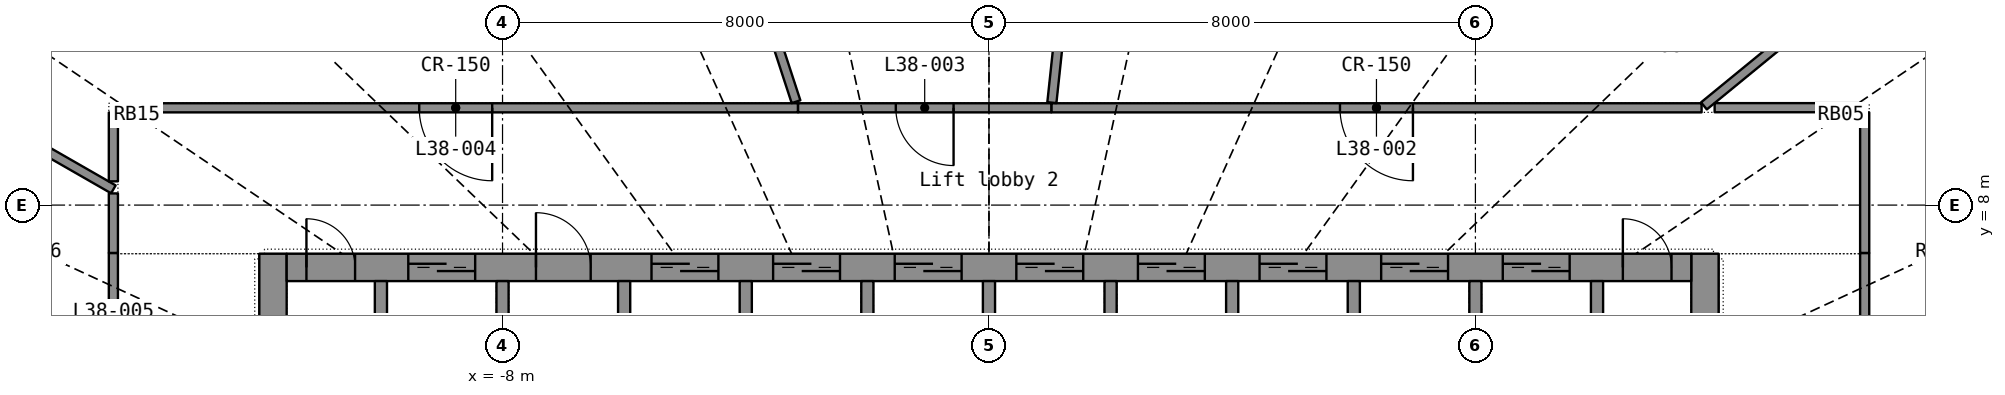
"""IFC4 building model, lengths in metres.
Left out: names, types, materials, properties, quantities, classifications, styles, units other than length and angle.
Written with IfcOpenShell. Run it as: python <this file> out.ifc"""

import sys

from ifc_helpers import new_model, si_unit, direction, frame, frame_2d, origin, place, context, subcontext, project, spatial, rectangle, extrude, element, fill, save


model = new_model("IFC4")
c1 = context("Model", 3, precision=1e-05, world=origin(), true_north=direction((0.0, 1.0)))
c2 = subcontext(c1, "Body", "Model", "MODEL_VIEW")
j1 = project(units=[si_unit("LENGTHUNIT", "METRE"), si_unit("PLANEANGLEUNIT", "RADIAN")], contexts=[c1])
p1 = place(None, origin())
s1 = spatial("IfcSite", under=j1, at=p1, CompositionType="ELEMENT")
p2 = place(p1, origin())
s2 = spatial("IfcBuilding", under=s1, at=p2, CompositionType="ELEMENT")
p3 = place(p2, frame((0.0, 0.0, 160.8)))
s3 = spatial("IfcBuildingStorey", under=s2, at=p3, CompositionType="ELEMENT", Elevation=160.8)
p4 = place(p3, frame((-11.775, -7.2, 0.0), z_axis=(0.0, 0.0, 1.0), x_axis=(0.0, 1.0, 0.0)))
e1 = element("IfcWall", 1, at=p4, inside=s3, PredefinedType="SHEAR", context=c2, shape_type="SweptSolid", body=[
    extrude(rectangle(XDim=14.4, YDim=0.45, at=frame_2d((7.2, 0.0))), origin(), (0.0, 0.0, 1.0), 3.3),
])
p5 = place(p4, frame((6.5, 0.0, 0.0)))
e2 = element("IfcOpeningElement", 2, at=p5, cuts=e1, PredefinedType="OPENING", context=c2, shape_type="SweptSolid", body=[
    extrude(rectangle(XDim=1.4, YDim=2.2, at=frame_2d((0.7, 1.1))), frame((0.0, 0.235, 0.0), z_axis=(0.0, -1.0, 0.0), x_axis=(1.0, 0.0, 0.0)), (0.0, 0.0, 1.0), 0.47),
])
p6 = place(p3, frame((11.775, -7.2, 0.0), z_axis=(0.0, 0.0, 1.0), x_axis=(0.0, 1.0, 0.0)))
e3 = element("IfcWall", 3, at=p6, inside=s3, PredefinedType="SHEAR", context=c2, shape_type="SweptSolid", body=[
    extrude(rectangle(XDim=14.4, YDim=0.45, at=frame_2d((7.2, 0.0))), origin(), (0.0, 0.0, 1.0), 3.3),
])
p7 = place(p6, frame((6.5, 0.0, 0.0)))
e4 = element("IfcOpeningElement", 4, at=p7, cuts=e3, PredefinedType="OPENING", context=c2, shape_type="SweptSolid", body=[
    extrude(rectangle(XDim=1.4, YDim=2.2, at=frame_2d((0.7, 1.1))), frame((0.0, 0.235, 0.0), z_axis=(0.0, -1.0, 0.0), x_axis=(1.0, 0.0, 0.0)), (0.0, 0.0, 1.0), 0.47),
])
p8 = place(p3, frame((-11.55, 6.975, 0.0), z_axis=(0.0, 0.0, 1.0), x_axis=(1.0, 0.0, 0.0)))
e5 = element("IfcWall", 5, at=p8, inside=s3, PredefinedType="SHEAR", context=c2, shape_type="SweptSolid", body=[
    extrude(rectangle(XDim=23.1, YDim=0.45, at=frame_2d((11.55, 0.0))), origin(), (0.0, 0.0, 1.0), 3.3),
])
p9 = place(p8, frame((2.0, 0.0, 0.0)))
e6 = element("IfcOpeningElement", 6, at=p9, cuts=e5, PredefinedType="OPENING", context=c2, shape_type="SweptSolid", body=[
    extrude(rectangle(XDim=1.1, YDim=2.2, at=frame_2d((0.55, 1.1))), frame((0.0, 0.235, 0.0), z_axis=(0.0, -1.0, 0.0), x_axis=(1.0, 0.0, 0.0)), (0.0, 0.0, 1.0), 0.47),
])
p10 = place(p8, frame((6.0, 0.0, 0.0)))
e7 = element("IfcOpeningElement", 7, at=p10, cuts=e5, PredefinedType="OPENING", context=c2, shape_type="SweptSolid", body=[
    extrude(rectangle(XDim=1.1, YDim=2.2, at=frame_2d((0.55, 1.1))), frame((0.0, 0.235, 0.0), z_axis=(0.0, -1.0, 0.0), x_axis=(1.0, 0.0, 0.0)), (0.0, 0.0, 1.0), 0.47),
])
p11 = place(p8, frame((8.0, 0.0, 0.0)))
e8 = element("IfcOpeningElement", 8, at=p11, cuts=e5, PredefinedType="OPENING", context=c2, shape_type="SweptSolid", body=[
    extrude(rectangle(XDim=1.1, YDim=2.2, at=frame_2d((0.55, 1.1))), frame((0.0, 0.235, 0.0), z_axis=(0.0, -1.0, 0.0), x_axis=(1.0, 0.0, 0.0)), (0.0, 0.0, 1.0), 0.47),
])
p12 = place(p8, frame((10.0, 0.0, 0.0)))
e9 = element("IfcOpeningElement", 9, at=p12, cuts=e5, PredefinedType="OPENING", context=c2, shape_type="SweptSolid", body=[
    extrude(rectangle(XDim=1.1, YDim=2.2, at=frame_2d((0.55, 1.1))), frame((0.0, 0.235, 0.0), z_axis=(0.0, -1.0, 0.0), x_axis=(1.0, 0.0, 0.0)), (0.0, 0.0, 1.0), 0.47),
])
p13 = place(p8, frame((12.0, 0.0, 0.0)))
e10 = element("IfcOpeningElement", 10, at=p13, cuts=e5, PredefinedType="OPENING", context=c2, shape_type="SweptSolid", body=[
    extrude(rectangle(XDim=1.1, YDim=2.2, at=frame_2d((0.55, 1.1))), frame((0.0, 0.235, 0.0), z_axis=(0.0, -1.0, 0.0), x_axis=(1.0, 0.0, 0.0)), (0.0, 0.0, 1.0), 0.47),
])
p14 = place(p8, frame((14.0, 0.0, 0.0)))
e11 = element("IfcOpeningElement", 11, at=p14, cuts=e5, PredefinedType="OPENING", context=c2, shape_type="SweptSolid", body=[
    extrude(rectangle(XDim=1.1, YDim=2.2, at=frame_2d((0.55, 1.1))), frame((0.0, 0.235, 0.0), z_axis=(0.0, -1.0, 0.0), x_axis=(1.0, 0.0, 0.0)), (0.0, 0.0, 1.0), 0.47),
])
p15 = place(p8, frame((16.0, 0.0, 0.0)))
e12 = element("IfcOpeningElement", 12, at=p15, cuts=e5, PredefinedType="OPENING", context=c2, shape_type="SweptSolid", body=[
    extrude(rectangle(XDim=1.1, YDim=2.2, at=frame_2d((0.55, 1.1))), frame((0.0, 0.235, 0.0), z_axis=(0.0, -1.0, 0.0), x_axis=(1.0, 0.0, 0.0)), (0.0, 0.0, 1.0), 0.47),
])
p16 = place(p8, frame((18.0, 0.0, 0.0)))
e13 = element("IfcOpeningElement", 13, at=p16, cuts=e5, PredefinedType="OPENING", context=c2, shape_type="SweptSolid", body=[
    extrude(rectangle(XDim=1.1, YDim=2.2, at=frame_2d((0.55, 1.1))), frame((0.0, 0.235, 0.0), z_axis=(0.0, -1.0, 0.0), x_axis=(1.0, 0.0, 0.0)), (0.0, 0.0, 1.0), 0.47),
])
p17 = place(p8, frame((20.0, 0.0, 0.0)))
e14 = element("IfcOpeningElement", 14, at=p17, cuts=e5, PredefinedType="OPENING", context=c2, shape_type="SweptSolid", body=[
    extrude(rectangle(XDim=1.1, YDim=2.2, at=frame_2d((0.55, 1.1))), frame((0.0, 0.235, 0.0), z_axis=(0.0, -1.0, 0.0), x_axis=(1.0, 0.0, 0.0)), (0.0, 0.0, 1.0), 0.47),
])
p18 = place(p8, frame((4.1, 0.0, 0.0)))
e15 = element("IfcOpeningElement", 15, at=p18, cuts=e5, PredefinedType="OPENING", context=c2, shape_type="SweptSolid", body=[
    extrude(rectangle(XDim=0.9, YDim=2.1, at=frame_2d((0.45, 1.05))), frame((0.0, 0.235, 0.0), z_axis=(0.0, -1.0, 0.0), x_axis=(1.0, 0.0, 0.0)), (0.0, 0.0, 1.0), 0.47),
])
p19 = place(p8, frame((0.325, 0.0, 0.0)))
e16 = element("IfcOpeningElement", 16, at=p19, cuts=e5, PredefinedType="OPENING", context=c2, shape_type="SweptSolid", body=[
    extrude(rectangle(XDim=0.8, YDim=2.05, at=frame_2d((0.4, 1.025))), frame((0.0, 0.235, 0.0), z_axis=(0.0, -1.0, 0.0), x_axis=(1.0, 0.0, 0.0)), (0.0, 0.0, 1.0), 0.47),
])
p20 = place(p8, frame((21.975, 0.0, 0.0)))
e17 = element("IfcOpeningElement", 17, at=p20, cuts=e5, PredefinedType="OPENING", context=c2, shape_type="SweptSolid", body=[
    extrude(rectangle(XDim=0.8, YDim=2.05, at=frame_2d((0.4, 1.025))), frame((0.0, 0.235, 0.0), z_axis=(0.0, -1.0, 0.0), x_axis=(1.0, 0.0, 0.0)), (0.0, 0.0, 1.0), 0.47),
])
for number, where, z_axis, x_axis in (
    (18, (-10.0, 3.9, 0.0), (0.0, 0.0, 1.0), (0.0, 1.0, 0.0)),
    (19, (-8.0, 3.9, 0.0), (0.0, 0.0, 1.0), (0.0, 1.0, 0.0)),
    (20, (-6.0, 3.9, 0.0), (0.0, 0.0, 1.0), (0.0, 1.0, 0.0)),
    (21, (-4.0, 3.9, 0.0), (0.0, 0.0, 1.0), (0.0, 1.0, 0.0)),
    (22, (-2.0, 3.9, 0.0), (0.0, 0.0, 1.0), (0.0, 1.0, 0.0)),
    (23, (0.0, 3.9, 0.0), (0.0, 0.0, 1.0), (0.0, 1.0, 0.0)),
    (24, (2.0, 3.9, 0.0), (0.0, 0.0, 1.0), (0.0, 1.0, 0.0)),
    (25, (4.0, 3.9, 0.0), (0.0, 0.0, 1.0), (0.0, 1.0, 0.0)),
    (26, (6.0, 3.9, 0.0), (0.0, 0.0, 1.0), (0.0, 1.0, 0.0)),
    (27, (8.0, 3.9, 0.0), (0.0, 0.0, 1.0), (0.0, 1.0, 0.0)),
    (28, (10.0, 3.9, 0.0), (0.0, 0.0, 1.0), (0.0, 1.0, 0.0)),
):
    element("IfcWall", number, at=place(p3, frame(where, z_axis=z_axis, x_axis=x_axis)), inside=s3, PredefinedType="SHEAR", context=c2, shape_type="SweptSolid", body=[
        extrude(rectangle(XDim=2.85, YDim=0.2, at=frame_2d((1.425, 0.0))), origin(), (0.0, 0.0, 1.0), 3.3),
    ])
p21 = place(p3, frame((-3.14, 9.6, 0.0), z_axis=(0.0, 0.0, 1.0), x_axis=(-1.0, 0.0, 0.0)))
e29 = element("IfcWall", 29, at=p21, inside=s3, PredefinedType="PARTITIONING", context=c2, shape_type="SweptSolid", body=[
    extrude(rectangle(XDim=11.26, YDim=0.15, at=frame_2d((5.63, 0.0))), origin(), (0.0, 0.0, 1.0), 2.4),
])
p22 = place(p21, frame((5.03, 0.0, 0.0)))
e30 = element("IfcOpeningElement", 30, at=p22, cuts=e29, PredefinedType="OPENING", context=c2, shape_type="SweptSolid", body=[
    extrude(rectangle(XDim=1.2, YDim=2.2, at=frame_2d((0.6, 1.1))), frame((0.0, 0.085, 0.0), z_axis=(0.0, -1.0, 0.0), x_axis=(1.0, 0.0, 0.0)), (0.0, 0.0, 1.0), 0.17),
])
p23 = place(p3, frame((11.72, 9.6, 0.0), z_axis=(0.0, 0.0, 1.0), x_axis=(-1.0, 0.0, 0.0)))
e31 = element("IfcWall", 31, at=p23, inside=s3, PredefinedType="PARTITIONING", context=c2, shape_type="SweptSolid", body=[
    extrude(rectangle(XDim=10.695, YDim=0.15, at=frame_2d((5.347, 0.0))), origin(), (0.0, 0.0, 1.0), 2.4),
])
p24 = place(p23, frame((4.747, 0.0, 0.0)))
e32 = element("IfcOpeningElement", 32, at=p24, cuts=e31, PredefinedType="OPENING", context=c2, shape_type="SweptSolid", body=[
    extrude(rectangle(XDim=1.2, YDim=2.2, at=frame_2d((0.6, 1.1))), frame((0.0, 0.085, 0.0), z_axis=(0.0, -1.0, 0.0), x_axis=(1.0, 0.0, 0.0)), (0.0, 0.0, 1.0), 0.17),
])
p25 = place(p3, frame((2.071, 19.393, 0.0), z_axis=(0.0, 0.0, 1.0), x_axis=(-0.106198491, -0.99434495, 0.0)))
e33 = element("IfcWall", 33, at=p25, inside=s3, PredefinedType="PARTITIONING", context=c2, shape_type="SweptSolid", body=[
    extrude(rectangle(XDim=9.763, YDim=0.15, at=frame_2d((4.882, 0.0))), origin(), (0.0, 0.0, 1.0), 2.4),
])
p26 = place(p3, frame((-6.152, 18.806, 0.0), z_axis=(0.0, 0.0, 1.0), x_axis=(0.310901784, -0.950442045, 0.0)))
e34 = element("IfcWall", 34, at=p26, inside=s3, PredefinedType="PARTITIONING", context=c2, shape_type="SweptSolid", body=[
    extrude(rectangle(XDim=9.58, YDim=0.15, at=frame_2d((4.79, 0.0))), origin(), (0.0, 0.0, 1.0), 2.4),
])
p27 = place(p3, frame((16.813, 13.772, 0.0), z_axis=(0.0, 0.0, 1.0), x_axis=(-0.773595956, -0.633679175, 0.0)))
e35 = element("IfcWall", 35, at=p27, inside=s3, PredefinedType="PARTITIONING", context=c2, shape_type="SweptSolid", body=[
    extrude(rectangle(XDim=6.535, YDim=0.15, at=frame_2d((3.267, 0.0))), origin(), (0.0, 0.0, 1.0), 2.4),
])
p28 = place(p3, frame((-19.483, 11.175, 0.0), z_axis=(0.0, 0.0, 1.0), x_axis=(0.867447243, -0.497529176, 0.0)))
e36 = element("IfcWall", 36, at=p28, inside=s3, PredefinedType="PARTITIONING", context=c2, shape_type="SweptSolid", body=[
    extrude(rectangle(XDim=5.86, YDim=0.15, at=frame_2d((2.93, 0.0))), origin(), (0.0, 0.0, 1.0), 2.4),
])
p29 = place(p3, frame((14.402, 1.579, 0.0), z_axis=(0.0, 0.0, 1.0), x_axis=(0.0, 1.0, 0.0)))
e37 = element("IfcWall", 37, at=p29, inside=s3, PredefinedType="PARTITIONING", context=c2, shape_type="SweptSolid", body=[
    extrude(rectangle(XDim=5.633, YDim=0.15, at=frame_2d((2.816, 0.0))), origin(), (0.0, 0.0, 1.0), 2.4),
])
p30 = place(p3, frame((1.025, 9.6, 0.0), z_axis=(0.0, 0.0, 1.0), x_axis=(-1.0, 0.0, 0.0)))
e38 = element("IfcWall", 38, at=p30, inside=s3, PredefinedType="PARTITIONING", context=c2, shape_type="SweptSolid", body=[
    extrude(rectangle(XDim=4.165, YDim=0.15, at=frame_2d((2.083, 0.0))), origin(), (0.0, 0.0, 1.0), 2.4),
])
p31 = place(p30, frame((1.607, 0.0, 0.0)))
e39 = element("IfcOpeningElement", 39, at=p31, cuts=e38, PredefinedType="OPENING", context=c2, shape_type="SweptSolid", body=[
    extrude(rectangle(XDim=0.95, YDim=2.15, at=frame_2d((0.475, 1.075))), frame((0.0, 0.085, 0.0), z_axis=(0.0, -1.0, 0.0), x_axis=(1.0, 0.0, 0.0)), (0.0, 0.0, 1.0), 0.17),
])
p32 = place(p3, frame((-14.4, 7.212, 0.0), z_axis=(0.0, 0.0, 1.0), x_axis=(0.0, -1.0, 0.0)))
e40 = element("IfcWall", 40, at=p32, inside=s3, PredefinedType="PARTITIONING", context=c2, shape_type="SweptSolid", body=[
    extrude(rectangle(XDim=3.956, YDim=0.15, at=frame_2d((1.978, 0.0))), origin(), (0.0, 0.0, 1.0), 2.4),
])
p33 = place(p32, frame((1.503, 0.0, 0.0)))
e41 = element("IfcOpeningElement", 41, at=p33, cuts=e40, PredefinedType="OPENING", context=c2, shape_type="SweptSolid", body=[
    extrude(rectangle(XDim=0.95, YDim=2.15, at=frame_2d((0.475, 1.075))), frame((0.0, 0.085, 0.0), z_axis=(0.0, -1.0, 0.0), x_axis=(1.0, 0.0, 0.0)), (0.0, 0.0, 1.0), 0.17),
])
p34 = place(p3, frame((14.402, 9.602, 0.0), z_axis=(0.0, 0.0, 1.0), x_axis=(-1.0, 0.0, 0.0)))
e42 = element("IfcWall", 42, at=p34, inside=s3, PredefinedType="PARTITIONING", context=c2, shape_type="SweptSolid", body=[
    extrude(rectangle(XDim=2.468, YDim=0.15, at=frame_2d((1.234, 0.0))), origin(), (0.0, 0.0, 1.0), 2.4),
])
p35 = place(p3, frame((14.402, 7.213, 0.0), z_axis=(0.0, 0.0, 1.0), x_axis=(0.0, 1.0, 0.0)))
e43 = element("IfcWall", 43, at=p35, inside=s3, PredefinedType="PARTITIONING", context=c2, shape_type="SweptSolid", body=[
    extrude(rectangle(XDim=2.312, YDim=0.15, at=frame_2d((1.156, 0.0))), origin(), (0.0, 0.0, 1.0), 2.4),
])
p36 = place(p3, frame((-14.4, 9.523, 0.0), z_axis=(0.0, 0.0, 1.0), x_axis=(0.0, -1.0, 0.0)))
e44 = element("IfcWall", 44, at=p36, inside=s3, PredefinedType="PARTITIONING", context=c2, shape_type="SweptSolid", body=[
    extrude(rectangle(XDim=1.132, YDim=0.15, at=frame_2d((0.566, 0.0))), origin(), (0.0, 0.0, 1.0), 2.4),
])
p37 = place(p3, frame((-14.4, 8.192, 0.0), z_axis=(0.0, 0.0, 1.0), x_axis=(0.0, -1.0, 0.0)))
e45 = element("IfcWall", 45, at=p37, inside=s3, PredefinedType="PARTITIONING", context=c2, shape_type="SweptSolid", body=[
    extrude(rectangle(XDim=0.979, YDim=0.15, at=frame_2d((0.49, 0.0))), origin(), (0.0, 0.0, 1.0), 2.4),
])
p38 = place(p9, origin())
e46 = element("IfcDoor", 46, at=p38, inside=s3, OperationType="DOUBLE_DOOR_SLIDING", PredefinedType="DOOR", context=c2, shape_type="SweptSolid", body=[
    extrude(rectangle(XDim=1.1, YDim=2.2, at=frame_2d((0.55, 1.1))), frame((0.0, 0.025, 0.0), z_axis=(0.0, -1.0, 0.0), x_axis=(1.0, 0.0, 0.0)), (0.0, 0.0, 1.0), 0.05),
])
fill(e6, e46)
p39 = place(p10, origin())
e47 = element("IfcDoor", 47, at=p39, inside=s3, OperationType="DOUBLE_DOOR_SLIDING", PredefinedType="DOOR", context=c2, shape_type="SweptSolid", body=[
    extrude(rectangle(XDim=1.1, YDim=2.2, at=frame_2d((0.55, 1.1))), frame((0.0, 0.025, 0.0), z_axis=(0.0, -1.0, 0.0), x_axis=(1.0, 0.0, 0.0)), (0.0, 0.0, 1.0), 0.05),
])
fill(e7, e47)
p40 = place(p11, origin())
e48 = element("IfcDoor", 48, at=p40, inside=s3, OperationType="DOUBLE_DOOR_SLIDING", PredefinedType="DOOR", context=c2, shape_type="SweptSolid", body=[
    extrude(rectangle(XDim=1.1, YDim=2.2, at=frame_2d((0.55, 1.1))), frame((0.0, 0.025, 0.0), z_axis=(0.0, -1.0, 0.0), x_axis=(1.0, 0.0, 0.0)), (0.0, 0.0, 1.0), 0.05),
])
fill(e8, e48)
p41 = place(p12, origin())
e49 = element("IfcDoor", 49, at=p41, inside=s3, OperationType="DOUBLE_DOOR_SLIDING", PredefinedType="DOOR", context=c2, shape_type="SweptSolid", body=[
    extrude(rectangle(XDim=1.1, YDim=2.2, at=frame_2d((0.55, 1.1))), frame((0.0, 0.025, 0.0), z_axis=(0.0, -1.0, 0.0), x_axis=(1.0, 0.0, 0.0)), (0.0, 0.0, 1.0), 0.05),
])
fill(e9, e49)
p42 = place(p13, origin())
e50 = element("IfcDoor", 50, at=p42, inside=s3, OperationType="DOUBLE_DOOR_SLIDING", PredefinedType="DOOR", context=c2, shape_type="SweptSolid", body=[
    extrude(rectangle(XDim=1.1, YDim=2.2, at=frame_2d((0.55, 1.1))), frame((0.0, 0.025, 0.0), z_axis=(0.0, -1.0, 0.0), x_axis=(1.0, 0.0, 0.0)), (0.0, 0.0, 1.0), 0.05),
])
fill(e10, e50)
p43 = place(p14, origin())
e51 = element("IfcDoor", 51, at=p43, inside=s3, OperationType="DOUBLE_DOOR_SLIDING", PredefinedType="DOOR", context=c2, shape_type="SweptSolid", body=[
    extrude(rectangle(XDim=1.1, YDim=2.2, at=frame_2d((0.55, 1.1))), frame((0.0, 0.025, 0.0), z_axis=(0.0, -1.0, 0.0), x_axis=(1.0, 0.0, 0.0)), (0.0, 0.0, 1.0), 0.05),
])
fill(e11, e51)
p44 = place(p15, origin())
e52 = element("IfcDoor", 52, at=p44, inside=s3, OperationType="DOUBLE_DOOR_SLIDING", PredefinedType="DOOR", context=c2, shape_type="SweptSolid", body=[
    extrude(rectangle(XDim=1.1, YDim=2.2, at=frame_2d((0.55, 1.1))), frame((0.0, 0.025, 0.0), z_axis=(0.0, -1.0, 0.0), x_axis=(1.0, 0.0, 0.0)), (0.0, 0.0, 1.0), 0.05),
])
fill(e12, e52)
p45 = place(p16, origin())
e53 = element("IfcDoor", 53, at=p45, inside=s3, OperationType="DOUBLE_DOOR_SLIDING", PredefinedType="DOOR", context=c2, shape_type="SweptSolid", body=[
    extrude(rectangle(XDim=1.1, YDim=2.2, at=frame_2d((0.55, 1.1))), frame((0.0, 0.025, 0.0), z_axis=(0.0, -1.0, 0.0), x_axis=(1.0, 0.0, 0.0)), (0.0, 0.0, 1.0), 0.05),
])
fill(e13, e53)
p46 = place(p17, origin())
e54 = element("IfcDoor", 54, at=p46, inside=s3, OperationType="DOUBLE_DOOR_SLIDING", PredefinedType="DOOR", context=c2, shape_type="SweptSolid", body=[
    extrude(rectangle(XDim=1.1, YDim=2.2, at=frame_2d((0.55, 1.1))), frame((0.0, 0.025, 0.0), z_axis=(0.0, -1.0, 0.0), x_axis=(1.0, 0.0, 0.0)), (0.0, 0.0, 1.0), 0.05),
])
fill(e14, e54)
p47 = place(p18, origin())
e55 = element("IfcDoor", 55, at=p47, inside=s3, OperationType="SINGLE_SWING_LEFT", PredefinedType="DOOR", context=c2, shape_type="SweptSolid", body=[
    extrude(rectangle(XDim=0.9, YDim=2.1, at=frame_2d((0.45, 1.05))), frame((0.0, 0.025, 0.0), z_axis=(0.0, -1.0, 0.0), x_axis=(1.0, 0.0, 0.0)), (0.0, 0.0, 1.0), 0.05),
])
fill(e15, e55)
p48 = place(p19, origin())
e56 = element("IfcDoor", 56, at=p48, inside=s3, OperationType="SINGLE_SWING_LEFT", PredefinedType="DOOR", context=c2, shape_type="SweptSolid", body=[
    extrude(rectangle(XDim=0.8, YDim=2.05, at=frame_2d((0.4, 1.025))), frame((0.0, 0.025, 0.0), z_axis=(0.0, -1.0, 0.0), x_axis=(1.0, 0.0, 0.0)), (0.0, 0.0, 1.0), 0.05),
])
fill(e16, e56)
p49 = place(p20, origin())
e57 = element("IfcDoor", 57, at=p49, inside=s3, OperationType="SINGLE_SWING_LEFT", PredefinedType="DOOR", context=c2, shape_type="SweptSolid", body=[
    extrude(rectangle(XDim=0.8, YDim=2.05, at=frame_2d((0.4, 1.025))), frame((0.0, 0.025, 0.0), z_axis=(0.0, -1.0, 0.0), x_axis=(1.0, 0.0, 0.0)), (0.0, 0.0, 1.0), 0.05),
])
fill(e17, e57)
p50 = place(p24, origin())
e58 = element("IfcDoor", 58, at=p50, inside=s3, OperationType="DOUBLE_DOOR_SINGLE_SWING", PredefinedType="DOOR", context=c2, shape_type="SweptSolid", body=[
    extrude(rectangle(XDim=1.2, YDim=2.2, at=frame_2d((0.6, 1.1))), frame((0.0, 0.025, 0.0), z_axis=(0.0, -1.0, 0.0), x_axis=(1.0, 0.0, 0.0)), (0.0, 0.0, 1.0), 0.05),
])
fill(e32, e58)
p51 = place(p31, origin())
e59 = element("IfcDoor", 59, at=p51, inside=s3, OperationType="SINGLE_SWING_LEFT", PredefinedType="DOOR", context=c2, shape_type="SweptSolid", body=[
    extrude(rectangle(XDim=0.95, YDim=2.15, at=frame_2d((0.475, 1.075))), frame((0.0, 0.025, 0.0), z_axis=(0.0, -1.0, 0.0), x_axis=(1.0, 0.0, 0.0)), (0.0, 0.0, 1.0), 0.05),
])
fill(e39, e59)
p52 = place(p22, origin())
e60 = element("IfcDoor", 60, at=p52, inside=s3, OperationType="DOUBLE_DOOR_SINGLE_SWING", PredefinedType="DOOR", context=c2, shape_type="SweptSolid", body=[
    extrude(rectangle(XDim=1.2, YDim=2.2, at=frame_2d((0.6, 1.1))), frame((0.0, 0.025, 0.0), z_axis=(0.0, -1.0, 0.0), x_axis=(1.0, 0.0, 0.0)), (0.0, 0.0, 1.0), 0.05),
])
fill(e30, e60)
save(model, sys.argv[1])
